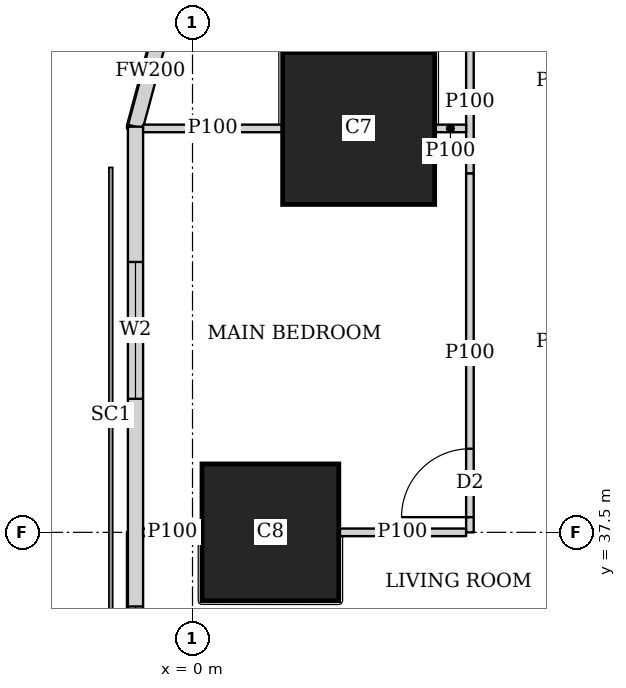
"""IFC4 building model, lengths in metres.
Left out: names, types, materials, properties, quantities, classifications, styles, units other than length and angle.
Written with IfcOpenShell. Run it as: python <this file> out.ifc"""

import sys

from ifc_helpers import new_model, si_unit, direction, frame, frame_2d, origin, origin_2d, place, context, subcontext, project, spatial, rectangle, extrude, element, fill, save


model = new_model("IFC4")
c1 = context("Model", 3, precision=1e-05, world=origin(), true_north=direction((0.0, 1.0)))
c2 = subcontext(c1, "Body", "Model", "MODEL_VIEW")
j1 = project(units=[si_unit("LENGTHUNIT", "METRE"), si_unit("PLANEANGLEUNIT", "RADIAN")], contexts=[c1])
p1 = place(None, origin())
s1 = spatial("IfcSite", under=j1, at=p1, CompositionType="ELEMENT")
p2 = place(p1, origin())
s2 = spatial("IfcBuilding", under=s1, at=p2, CompositionType="ELEMENT")
p3 = place(p2, frame((0.0, 0.0, 147.05)))
s3 = spatial("IfcBuildingStorey", under=s2, at=p3, CompositionType="ELEMENT", Elevation=147.05)
p4 = place(p3, frame((1.025, 37.5, 0.0), z_axis=(0.0, 0.0, 1.0), x_axis=(1.0, 0.0, 0.0)))
e1 = element("IfcColumn", 1, at=p4, inside=s3, PredefinedType="COLUMN", context=c2, shape_type="SweptSolid", body=[
    extrude(rectangle(XDim=1.8, YDim=1.8, at=origin_2d()), origin(), (0.0, 0.0, 1.0), 3.75),
])
p5 = place(p3, frame((2.186, 42.814, 0.0), z_axis=(0.0, 0.0, 1.0), x_axis=(1.0, 0.0, 0.0)))
e2 = element("IfcColumn", 2, at=p5, inside=s3, PredefinedType="COLUMN", context=c2, shape_type="SweptSolid", body=[
    extrude(rectangle(XDim=2.0, YDim=2.0, at=origin_2d()), origin(), (0.0, 0.0, 1.0), 3.75),
])
p6 = place(p3, frame((-0.358, 44.298, 0.0), z_axis=(0.0, 0.0, 1.0), x_axis=(-0.259168954497, -0.965832000415, 0.0)))
e3 = element("IfcWall", 3, at=p6, inside=s3, PredefinedType="SOLIDWALL", context=c2, shape_type="SweptSolid", body=[
    extrude(rectangle(XDim=1.513, YDim=0.2, at=frame_2d((0.756, 0.0))), origin(), (0.0, 0.0, 1.0), 3.5),
])
p7 = place(p3, frame((-0.75, 42.837, 0.0), z_axis=(0.0, 0.0, 1.0), x_axis=(0.0, -1.0, 0.0)))
e4 = element("IfcWall", 4, at=p7, inside=s3, PredefinedType="SOLIDWALL", context=c2, shape_type="SweptSolid", body=[
    extrude(rectangle(XDim=40.674, YDim=0.2, at=frame_2d((20.337, 0.0))), origin(), (0.0, 0.0, 1.0), 3.5),
])
p8 = place(p7, frame((1.78, 0.0, 0.9)))
e5 = element("IfcOpeningElement", 5, at=p8, cuts=e4, PredefinedType="OPENING", context=c2, shape_type="SweptSolid", body=[
    extrude(rectangle(XDim=1.8, YDim=1.5, at=frame_2d((0.9, 0.75))), frame((0.0, 0.11, 0.0), z_axis=(0.0, -1.0, 0.0), x_axis=(1.0, 0.0, 0.0)), (0.0, 0.0, 1.0), 0.22),
])
p9 = place(p7, frame((6.312, 0.0, 0.9)))
e6 = element("IfcOpeningElement", 6, at=p9, cuts=e4, PredefinedType="OPENING", context=c2, shape_type="SweptSolid", body=[
    extrude(rectangle(XDim=1.8, YDim=1.5, at=frame_2d((0.9, 0.75))), frame((0.0, 0.11, 0.0), z_axis=(0.0, -1.0, 0.0), x_axis=(1.0, 0.0, 0.0)), (0.0, 0.0, 1.0), 0.22),
])
p10 = place(p7, frame((10.062, 0.0, 0.9)))
e7 = element("IfcOpeningElement", 7, at=p10, cuts=e4, PredefinedType="OPENING", context=c2, shape_type="SweptSolid", body=[
    extrude(rectangle(XDim=1.8, YDim=1.5, at=frame_2d((0.9, 0.75))), frame((0.0, 0.11, 0.0), z_axis=(0.0, -1.0, 0.0), x_axis=(1.0, 0.0, 0.0)), (0.0, 0.0, 1.0), 0.22),
])
p11 = place(p7, frame((13.812, 0.0, 0.9)))
e8 = element("IfcOpeningElement", 8, at=p11, cuts=e4, PredefinedType="OPENING", context=c2, shape_type="SweptSolid", body=[
    extrude(rectangle(XDim=1.8, YDim=1.5, at=frame_2d((0.9, 0.75))), frame((0.0, 0.11, 0.0), z_axis=(0.0, -1.0, 0.0), x_axis=(1.0, 0.0, 0.0)), (0.0, 0.0, 1.0), 0.22),
])
p12 = place(p7, frame((17.562, 0.0, 0.9)))
e9 = element("IfcOpeningElement", 9, at=p12, cuts=e4, PredefinedType="OPENING", context=c2, shape_type="SweptSolid", body=[
    extrude(rectangle(XDim=1.8, YDim=1.5, at=frame_2d((0.9, 0.75))), frame((0.0, 0.11, 0.0), z_axis=(0.0, -1.0, 0.0), x_axis=(1.0, 0.0, 0.0)), (0.0, 0.0, 1.0), 0.22),
])
p13 = place(p7, frame((21.312, 0.0, 0.9)))
e10 = element("IfcOpeningElement", 10, at=p13, cuts=e4, PredefinedType="OPENING", context=c2, shape_type="SweptSolid", body=[
    extrude(rectangle(XDim=1.8, YDim=1.5, at=frame_2d((0.9, 0.75))), frame((0.0, 0.11, 0.0), z_axis=(0.0, -1.0, 0.0), x_axis=(1.0, 0.0, 0.0)), (0.0, 0.0, 1.0), 0.22),
])
p14 = place(p7, frame((25.062, 0.0, 0.9)))
e11 = element("IfcOpeningElement", 11, at=p14, cuts=e4, PredefinedType="OPENING", context=c2, shape_type="SweptSolid", body=[
    extrude(rectangle(XDim=1.8, YDim=1.5, at=frame_2d((0.9, 0.75))), frame((0.0, 0.11, 0.0), z_axis=(0.0, -1.0, 0.0), x_axis=(1.0, 0.0, 0.0)), (0.0, 0.0, 1.0), 0.22),
])
p15 = place(p7, frame((28.812, 0.0, 0.9)))
e12 = element("IfcOpeningElement", 12, at=p15, cuts=e4, PredefinedType="OPENING", context=c2, shape_type="SweptSolid", body=[
    extrude(rectangle(XDim=1.8, YDim=1.5, at=frame_2d((0.9, 0.75))), frame((0.0, 0.11, 0.0), z_axis=(0.0, -1.0, 0.0), x_axis=(1.0, 0.0, 0.0)), (0.0, 0.0, 1.0), 0.22),
])
p16 = place(p7, frame((32.562, 0.0, 0.9)))
e13 = element("IfcOpeningElement", 13, at=p16, cuts=e4, PredefinedType="OPENING", context=c2, shape_type="SweptSolid", body=[
    extrude(rectangle(XDim=1.8, YDim=1.5, at=frame_2d((0.9, 0.75))), frame((0.0, 0.11, 0.0), z_axis=(0.0, -1.0, 0.0), x_axis=(1.0, 0.0, 0.0)), (0.0, 0.0, 1.0), 0.22),
])
p17 = place(p7, frame((37.094, 0.0, 0.9)))
e14 = element("IfcOpeningElement", 14, at=p17, cuts=e4, PredefinedType="OPENING", context=c2, shape_type="SweptSolid", body=[
    extrude(rectangle(XDim=1.8, YDim=1.5, at=frame_2d((0.9, 0.75))), frame((0.0, 0.11, 0.0), z_axis=(0.0, -1.0, 0.0), x_axis=(1.0, 0.0, 0.0)), (0.0, 0.0, 1.0), 0.22),
])
p18 = place(p3, frame((3.65, 37.5, 0.0), z_axis=(0.0, 0.0, 1.0), x_axis=(0.0, 1.0, 0.0)))
e15 = element("IfcWall", 15, at=p18, inside=s3, PredefinedType="PARTITIONING", context=c2, shape_type="SweptSolid", body=[
    extrude(rectangle(XDim=4.724, YDim=0.1, at=frame_2d((2.362, 0.0))), origin(), (0.0, 0.0, 1.0), 3.5),
])
p19 = place(p18, frame((0.2, 0.0, 0.0)))
e16 = element("IfcOpeningElement", 16, at=p19, cuts=e15, PredefinedType="OPENING", context=c2, shape_type="SweptSolid", body=[
    extrude(rectangle(XDim=0.9, YDim=2.1, at=frame_2d((0.45, 1.05))), frame((0.0, 0.06, 0.0), z_axis=(0.0, -1.0, 0.0), x_axis=(1.0, 0.0, 0.0)), (0.0, 0.0, 1.0), 0.12),
])
p20 = place(p3, frame((3.65, 42.224, 0.0), z_axis=(0.0, 0.0, 1.0), x_axis=(0.0, 1.0, 0.0)))
e17 = element("IfcWall", 17, at=p20, inside=s3, PredefinedType="PARTITIONING", context=c2, shape_type="SweptSolid", body=[
    extrude(rectangle(XDim=1.873, YDim=0.1, at=frame_2d((0.937, 0.0))), origin(), (0.0, 0.0, 1.0), 2.1),
])
p21 = place(p3, frame((-0.65, 37.5, 0.0), z_axis=(0.0, 0.0, 1.0), x_axis=(1.0, 0.0, 0.0)))
e18 = element("IfcWall", 18, at=p21, inside=s3, PredefinedType="PARTITIONING", context=c2, shape_type="SweptSolid", body=[
    extrude(rectangle(XDim=0.774, YDim=0.1, at=frame_2d((0.387, 0.0))), origin(), (0.0, 0.0, 1.0), 3.5),
])
p22 = place(p3, frame((1.926, 37.5, 0.0), z_axis=(0.0, 0.0, 1.0), x_axis=(1.0, 0.0, 0.0)))
e19 = element("IfcWall", 19, at=p22, inside=s3, PredefinedType="PARTITIONING", context=c2, shape_type="SweptSolid", body=[
    extrude(rectangle(XDim=1.674, YDim=0.1, at=frame_2d((0.837, 0.0))), origin(), (0.0, 0.0, 1.0), 2.1),
])
p23 = place(p3, frame((-0.65, 42.814, 0.0), z_axis=(0.0, 0.0, 1.0), x_axis=(1.0, 0.0, 0.0)))
e20 = element("IfcWall", 20, at=p23, inside=s3, PredefinedType="PARTITIONING", context=c2, shape_type="SweptSolid", body=[
    extrude(rectangle(XDim=1.835, YDim=0.1, at=frame_2d((0.917, 0.0))), origin(), (0.0, 0.0, 1.0), 3.5),
])
p24 = place(p3, frame((3.187, 42.814, 0.0), z_axis=(0.0, 0.0, 1.0), x_axis=(1.0, 0.0, 0.0)))
e21 = element("IfcWall", 21, at=p24, inside=s3, PredefinedType="PARTITIONING", context=c2, shape_type="SweptSolid", body=[
    extrude(rectangle(XDim=0.413, YDim=0.1, at=frame_2d((0.207, 0.0))), origin(), (0.0, 0.0, 1.0), 2.1),
])
p25 = place(p8, origin())
e22 = element("IfcWindow", 22, at=p25, inside=s3, PartitioningType="SINGLE_PANEL", PredefinedType="WINDOW", context=c2, shape_type="SweptSolid", body=[
    extrude(rectangle(XDim=1.8, YDim=1.5, at=frame_2d((0.9, 0.75))), frame((0.0, 0.03, 0.0), z_axis=(0.0, -1.0, 0.0), x_axis=(1.0, 0.0, 0.0)), (0.0, 0.0, 1.0), 0.06),
])
fill(e5, e22)
p26 = place(p9, origin())
e23 = element("IfcWindow", 23, at=p26, inside=s3, PartitioningType="SINGLE_PANEL", PredefinedType="WINDOW", context=c2, shape_type="SweptSolid", body=[
    extrude(rectangle(XDim=1.8, YDim=1.5, at=frame_2d((0.9, 0.75))), frame((0.0, 0.03, 0.0), z_axis=(0.0, -1.0, 0.0), x_axis=(1.0, 0.0, 0.0)), (0.0, 0.0, 1.0), 0.06),
])
fill(e6, e23)
p27 = place(p19, origin())
e24 = element("IfcDoor", 24, at=p27, inside=s3, OperationType="SINGLE_SWING_LEFT", PredefinedType="DOOR", context=c2, shape_type="SweptSolid", body=[
    extrude(rectangle(XDim=0.9, YDim=2.1, at=frame_2d((0.45, 1.05))), frame((0.0, 0.025, 0.0), z_axis=(0.0, -1.0, 0.0), x_axis=(1.0, 0.0, 0.0)), (0.0, 0.0, 1.0), 0.05),
])
fill(e16, e24)
save(model, sys.argv[1])
